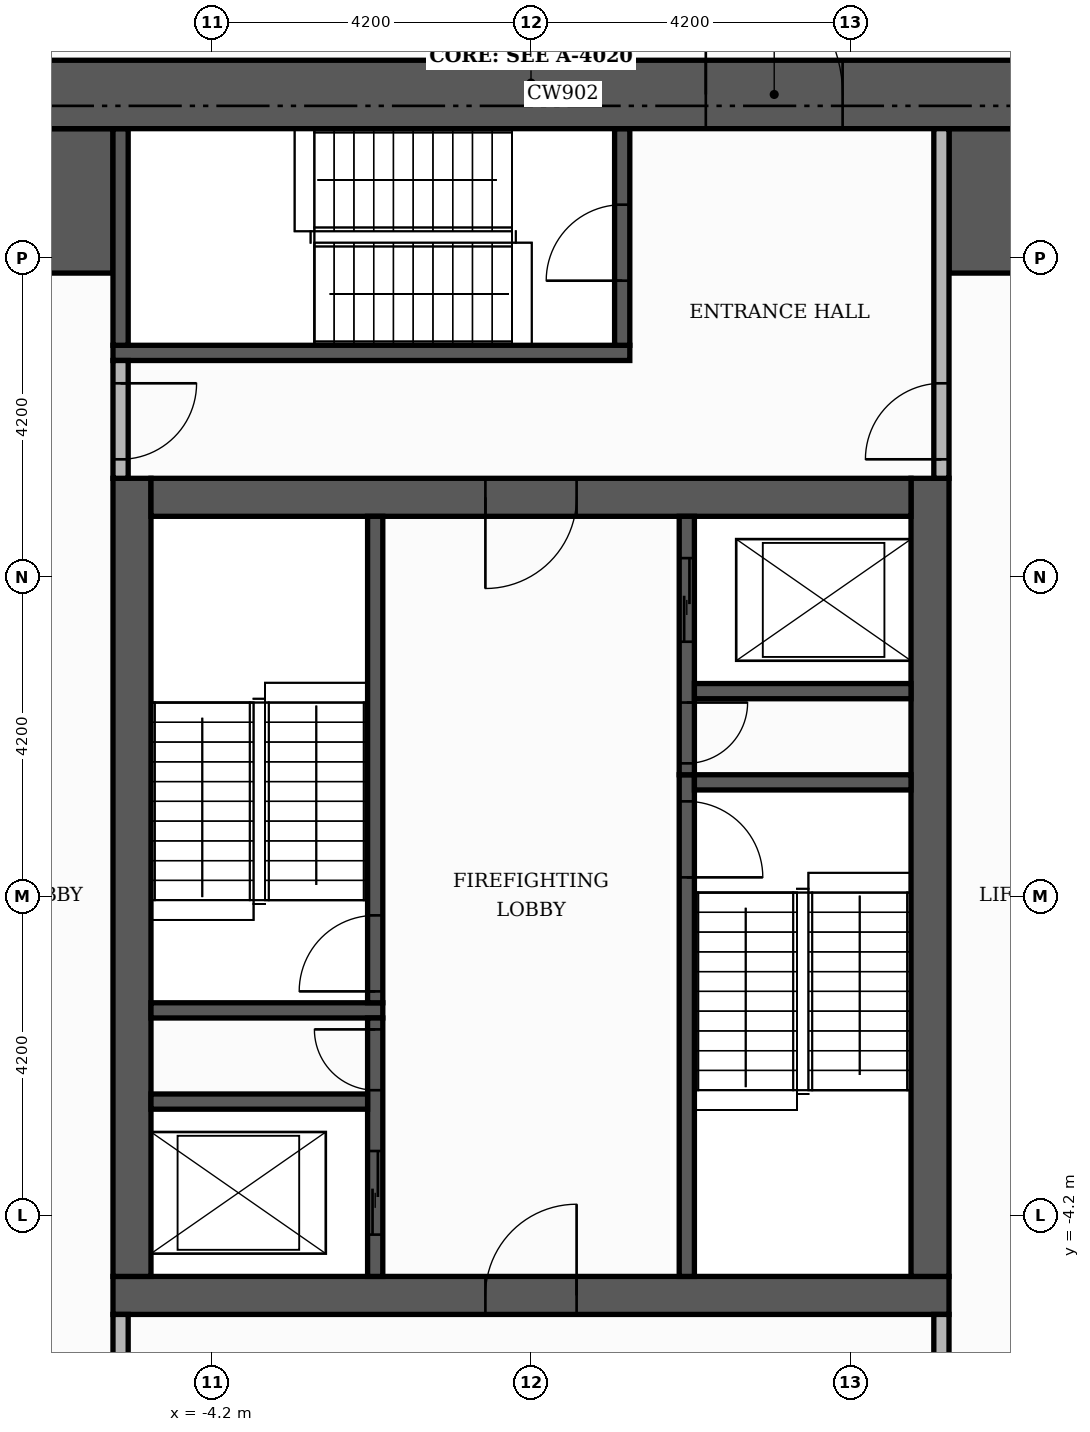
"""IFC4 building model, lengths in metres.
Left out: names, types, materials, properties, quantities, classifications, styles, units other than length and angle.
Written with IfcOpenShell. Run it as: python <this file> out.ifc"""

import sys

from ifc_helpers import new_model, si_unit, direction, frame, frame_2d, origin, place, context, subcontext, project, spatial, rectangle, extrude, element, fill, save


model = new_model("IFC4")
c1 = context("Model", 3, precision=1e-05, world=origin(), true_north=direction((0.0, 1.0)))
c2 = subcontext(c1, "Body", "Model", "MODEL_VIEW")
j1 = project(units=[si_unit("LENGTHUNIT", "METRE"), si_unit("PLANEANGLEUNIT", "RADIAN")], contexts=[c1])
p1 = place(None, origin())
s1 = spatial("IfcSite", under=j1, at=p1, CompositionType="ELEMENT")
p2 = place(p1, origin())
s2 = spatial("IfcBuilding", under=s1, at=p2, CompositionType="ELEMENT")
p3 = place(p2, frame((0.0, 0.0, 126.0)))
s3 = spatial("IfcBuildingStorey", under=s2, at=p3, CompositionType="ELEMENT", Elevation=126.0)
p4 = place(p3, frame((-5.5, -5.25, 0.0), z_axis=(0.0, 0.0, 1.0), x_axis=(1.0, 0.0, 0.0)))
e1 = element("IfcWall", 1, at=p4, inside=s3, PredefinedType="SHEAR", context=c2, shape_type="SweptSolid", body=[
    extrude(rectangle(XDim=11.0, YDim=0.5, at=frame_2d((5.5, 0.0))), origin(), (0.0, 0.0, 1.0), 7.38),
])
p5 = place(p4, frame((4.9, 0.0, 0.0)))
e2 = element("IfcOpeningElement", 2, at=p5, cuts=e1, PredefinedType="OPENING", context=c2, shape_type="SweptSolid", body=[
    extrude(rectangle(XDim=1.2, YDim=2.1, at=frame_2d((0.6, 1.05))), frame((0.0, 0.26, 0.0), z_axis=(0.0, -1.0, 0.0), x_axis=(1.0, 0.0, 0.0)), (0.0, 0.0, 1.0), 0.52),
])
for number, where, z_axis, x_axis in (
    (3, (-5.25, -5.0, 0.0), (0.0, 0.0, 1.0), (0.0, 1.0, 0.0)),
    (4, (5.25, -5.0, 0.0), (0.0, 0.0, 1.0), (0.0, 1.0, 0.0)),
):
    element("IfcWall", number, at=place(p3, frame(where, z_axis=z_axis, x_axis=x_axis)), inside=s3, PredefinedType="SHEAR", context=c2, shape_type="SweptSolid", body=[
        extrude(rectangle(XDim=10.5, YDim=0.5, at=frame_2d((5.25, 0.0))), origin(), (0.0, 0.0, 1.0), 7.38),
    ])
p6 = place(p3, frame((-5.0, 5.25, 0.0), z_axis=(0.0, 0.0, 1.0), x_axis=(1.0, 0.0, 0.0)))
e5 = element("IfcWall", 5, at=p6, inside=s3, PredefinedType="SHEAR", context=c2, shape_type="SweptSolid", body=[
    extrude(rectangle(XDim=10.0, YDim=0.5, at=frame_2d((5.0, 0.0))), origin(), (0.0, 0.0, 1.0), 7.38),
])
p7 = place(p6, frame((4.4, 0.0, 0.0)))
e6 = element("IfcOpeningElement", 6, at=p7, cuts=e5, PredefinedType="OPENING", context=c2, shape_type="SweptSolid", body=[
    extrude(rectangle(XDim=1.2, YDim=2.1, at=frame_2d((0.6, 1.05))), frame((0.0, 0.26, 0.0), z_axis=(0.0, -1.0, 0.0), x_axis=(1.0, 0.0, 0.0)), (0.0, 0.0, 1.0), 0.52),
])
for number, where, z_axis, x_axis in (
    (7, (-10.1, 9.15, 0.0), (0.0, 0.0, 1.0), (1.0, 0.0, 0.0)),
    (8, (5.5, 9.15, 0.0), (0.0, 0.0, 1.0), (1.0, 0.0, 0.0)),
):
    element("IfcWall", number, at=place(p3, frame(where, z_axis=z_axis, x_axis=x_axis)), inside=s3, PredefinedType="SHEAR", context=c2, shape_type="SweptSolid", body=[
        extrude(rectangle(XDim=4.6, YDim=1.9, at=frame_2d((2.3, 0.0))), origin(), (0.0, 0.0, 1.0), 7.38),
    ])
p8 = place(p3, frame((2.05, -5.0, 0.0), z_axis=(0.0, 0.0, 1.0), x_axis=(0.0, 1.0, 0.0)))
e9 = element("IfcWall", 9, at=p8, inside=s3, PredefinedType="SHEAR", context=c2, shape_type="SweptSolid", body=[
    extrude(rectangle(XDim=6.6, YDim=0.2, at=frame_2d((3.3, 0.0))), origin(), (0.0, 0.0, 1.0), 7.38),
])
p9 = place(p8, frame((5.25, 0.0, 0.0)))
e10 = element("IfcOpeningElement", 10, at=p9, cuts=e9, PredefinedType="OPENING", context=c2, shape_type="SweptSolid", body=[
    extrude(rectangle(XDim=1.0, YDim=2.1, at=frame_2d((0.5, 1.05))), frame((0.0, 0.11, 0.0), z_axis=(0.0, -1.0, 0.0), x_axis=(1.0, 0.0, 0.0)), (0.0, 0.0, 1.0), 0.22),
])
p10 = place(p3, frame((-5.0, -1.5, 0.0), z_axis=(0.0, 0.0, 1.0), x_axis=(1.0, 0.0, 0.0)))
e11 = element("IfcWall", 11, at=p10, inside=s3, PredefinedType="SHEAR", context=c2, shape_type="SweptSolid", body=[
    extrude(rectangle(XDim=3.05, YDim=0.2, at=frame_2d((1.525, 0.0))), origin(), (0.0, 0.0, 1.0), 7.38),
])
p11 = place(p3, frame((-2.05, -1.4, 0.0), z_axis=(0.0, 0.0, 1.0), x_axis=(0.0, 1.0, 0.0)))
e12 = element("IfcWall", 12, at=p11, inside=s3, PredefinedType="SHEAR", context=c2, shape_type="SweptSolid", body=[
    extrude(rectangle(XDim=6.4, YDim=0.2, at=frame_2d((3.2, 0.0))), origin(), (0.0, 0.0, 1.0), 7.38),
])
p12 = place(p11, frame((0.15, 0.0, 0.0)))
e13 = element("IfcOpeningElement", 13, at=p12, cuts=e12, PredefinedType="OPENING", context=c2, shape_type="SweptSolid", body=[
    extrude(rectangle(XDim=1.0, YDim=2.1, at=frame_2d((0.5, 1.05))), frame((0.0, 0.11, 0.0), z_axis=(0.0, -1.0, 0.0), x_axis=(1.0, 0.0, 0.0)), (0.0, 0.0, 1.0), 0.22),
])
p13 = place(p3, frame((2.15, 1.5, 0.0), z_axis=(0.0, 0.0, 1.0), x_axis=(1.0, 0.0, 0.0)))
e14 = element("IfcWall", 14, at=p13, inside=s3, PredefinedType="SHEAR", context=c2, shape_type="SweptSolid", body=[
    extrude(rectangle(XDim=2.85, YDim=0.2, at=frame_2d((1.425, 0.0))), origin(), (0.0, 0.0, 1.0), 7.38),
])
p14 = place(p3, frame((-5.5, 7.15, 0.0), z_axis=(0.0, 0.0, 1.0), x_axis=(1.0, 0.0, 0.0)))
e15 = element("IfcWall", 15, at=p14, inside=s3, PredefinedType="SHEAR", context=c2, shape_type="SweptSolid", body=[
    extrude(rectangle(XDim=6.8, YDim=0.2, at=frame_2d((3.4, 0.0))), origin(), (0.0, 0.0, 1.0), 7.38),
])
p15 = place(p3, frame((-5.4, 7.25, 0.0), z_axis=(0.0, 0.0, 1.0), x_axis=(0.0, 1.0, 0.0)))
e16 = element("IfcWall", 16, at=p15, inside=s3, PredefinedType="SHEAR", context=c2, shape_type="SweptSolid", body=[
    extrude(rectangle(XDim=2.85, YDim=0.2, at=frame_2d((1.425, 0.0))), origin(), (0.0, 0.0, 1.0), 7.38),
])
p16 = place(p3, frame((1.2, 7.25, 0.0), z_axis=(0.0, 0.0, 1.0), x_axis=(0.0, 1.0, 0.0)))
e17 = element("IfcWall", 17, at=p16, inside=s3, PredefinedType="SHEAR", context=c2, shape_type="SweptSolid", body=[
    extrude(rectangle(XDim=2.85, YDim=0.2, at=frame_2d((1.425, 0.0))), origin(), (0.0, 0.0, 1.0), 7.38),
])
p17 = place(p16, frame((0.85, 0.0, 0.0)))
e18 = element("IfcOpeningElement", 18, at=p17, cuts=e17, PredefinedType="OPENING", context=c2, shape_type="SweptSolid", body=[
    extrude(rectangle(XDim=1.0, YDim=2.1, at=frame_2d((0.5, 1.05))), frame((0.0, 0.11, 0.0), z_axis=(0.0, -1.0, 0.0), x_axis=(1.0, 0.0, 0.0)), (0.0, 0.0, 1.0), 0.22),
])
p18 = place(p3, frame((-2.05, -5.0, 0.0), z_axis=(0.0, 0.0, 1.0), x_axis=(0.0, 1.0, 0.0)))
e19 = element("IfcWall", 19, at=p18, inside=s3, PredefinedType="SHEAR", context=c2, shape_type="SweptSolid", body=[
    extrude(rectangle(XDim=3.4, YDim=0.2, at=frame_2d((1.7, 0.0))), origin(), (0.0, 0.0, 1.0), 7.38),
])
p19 = place(p18, frame((0.55, 0.0, 0.0)))
e20 = element("IfcOpeningElement", 20, at=p19, cuts=e19, PredefinedType="OPENING", context=c2, shape_type="SweptSolid", body=[
    extrude(rectangle(XDim=1.1, YDim=2.1, at=frame_2d((0.55, 1.05))), frame((0.0, 0.11, 0.0), z_axis=(0.0, -1.0, 0.0), x_axis=(1.0, 0.0, 0.0)), (0.0, 0.0, 1.0), 0.22),
])
p20 = place(p18, frame((2.45, 0.0, 0.0)))
e21 = element("IfcOpeningElement", 21, at=p20, cuts=e19, PredefinedType="OPENING", context=c2, shape_type="SweptSolid", body=[
    extrude(rectangle(XDim=0.8, YDim=2.1, at=frame_2d((0.4, 1.05))), frame((0.0, 0.11, 0.0), z_axis=(0.0, -1.0, 0.0), x_axis=(1.0, 0.0, 0.0)), (0.0, 0.0, 1.0), 0.22),
])
p21 = place(p3, frame((-5.0, -2.7, 0.0), z_axis=(0.0, 0.0, 1.0), x_axis=(1.0, 0.0, 0.0)))
e22 = element("IfcWall", 22, at=p21, inside=s3, PredefinedType="SHEAR", context=c2, shape_type="SweptSolid", body=[
    extrude(rectangle(XDim=2.85, YDim=0.2, at=frame_2d((1.425, 0.0))), origin(), (0.0, 0.0, 1.0), 7.38),
])
p22 = place(p3, frame((2.05, 1.6, 0.0), z_axis=(0.0, 0.0, 1.0), x_axis=(0.0, 1.0, 0.0)))
e23 = element("IfcWall", 23, at=p22, inside=s3, PredefinedType="SHEAR", context=c2, shape_type="SweptSolid", body=[
    extrude(rectangle(XDim=3.4, YDim=0.2, at=frame_2d((1.7, 0.0))), origin(), (0.0, 0.0, 1.0), 7.38),
])
p23 = place(p22, frame((1.75, 0.0, 0.0)))
e24 = element("IfcOpeningElement", 24, at=p23, cuts=e23, PredefinedType="OPENING", context=c2, shape_type="SweptSolid", body=[
    extrude(rectangle(XDim=1.1, YDim=2.1, at=frame_2d((0.55, 1.05))), frame((0.0, 0.11, 0.0), z_axis=(0.0, -1.0, 0.0), x_axis=(1.0, 0.0, 0.0)), (0.0, 0.0, 1.0), 0.22),
])
p24 = place(p22, frame((0.15, 0.0, 0.0)))
e25 = element("IfcOpeningElement", 25, at=p24, cuts=e23, PredefinedType="OPENING", context=c2, shape_type="SweptSolid", body=[
    extrude(rectangle(XDim=0.8, YDim=2.1, at=frame_2d((0.4, 1.05))), frame((0.0, 0.11, 0.0), z_axis=(0.0, -1.0, 0.0), x_axis=(1.0, 0.0, 0.0)), (0.0, 0.0, 1.0), 0.22),
])
p25 = place(p3, frame((2.15, 2.7, 0.0), z_axis=(0.0, 0.0, 1.0), x_axis=(1.0, 0.0, 0.0)))
e26 = element("IfcWall", 26, at=p25, inside=s3, PredefinedType="SHEAR", context=c2, shape_type="SweptSolid", body=[
    extrude(rectangle(XDim=2.85, YDim=0.2, at=frame_2d((1.425, 0.0))), origin(), (0.0, 0.0, 1.0), 7.38),
])
p26 = place(p3, frame((-11.0, 10.55, 0.0), z_axis=(0.0, 0.0, 1.0), x_axis=(1.0, 0.0, 0.0)))
e27 = element("IfcWall", 27, at=p26, inside=s3, PredefinedType="SHEAR", context=c2, shape_type="SweptSolid", body=[
    extrude(rectangle(XDim=22.0, YDim=0.9, at=frame_2d((11.0, 0.0))), origin(), (0.0, 0.0, 1.0), 7.38),
])
p27 = place(p26, frame((13.3, 0.0, 0.0)))
e28 = element("IfcOpeningElement", 28, at=p27, cuts=e27, PredefinedType="OPENING", context=c2, shape_type="SweptSolid", body=[
    extrude(rectangle(XDim=1.8, YDim=2.2, at=frame_2d((0.9, 1.1))), frame((0.0, 0.46, 0.0), z_axis=(0.0, -1.0, 0.0), x_axis=(1.0, 0.0, 0.0)), (0.0, 0.0, 1.0), 0.92),
])
p28 = place(p3, frame((-5.4, -10.1, 0.0), z_axis=(0.0, 0.0, 1.0), x_axis=(0.0, 1.0, 0.0)))
e29 = element("IfcWall", 29, at=p28, inside=s3, PredefinedType="PARTITIONING", context=c2, shape_type="SweptSolid", body=[
    extrude(rectangle(XDim=4.6, YDim=0.2, at=frame_2d((2.3, 0.0))), origin(), (0.0, 0.0, 1.0), 7.38),
])
p29 = place(p28, frame((2.9, 0.0, 0.0)))
e30 = element("IfcOpeningElement", 30, at=p29, cuts=e29, PredefinedType="OPENING", context=c2, shape_type="SweptSolid", body=[
    extrude(rectangle(XDim=1.0, YDim=2.1, at=frame_2d((0.5, 1.05))), frame((0.0, 0.11, 0.0), z_axis=(0.0, -1.0, 0.0), x_axis=(1.0, 0.0, 0.0)), (0.0, 0.0, 1.0), 0.22),
])
p30 = place(p3, frame((5.4, -7.9, 0.0), z_axis=(0.0, 0.0, 1.0), x_axis=(0.0, 1.0, 0.0)))
e31 = element("IfcWall", 31, at=p30, inside=s3, PredefinedType="PARTITIONING", context=c2, shape_type="SweptSolid", body=[
    extrude(rectangle(XDim=2.4, YDim=0.2, at=frame_2d((1.2, 0.0))), origin(), (0.0, 0.0, 1.0), 7.38),
])
p31 = place(p30, frame((0.7, 0.0, 0.0)))
e32 = element("IfcOpeningElement", 32, at=p31, cuts=e31, PredefinedType="OPENING", context=c2, shape_type="SweptSolid", body=[
    extrude(rectangle(XDim=1.0, YDim=2.1, at=frame_2d((0.5, 1.05))), frame((0.0, 0.11, 0.0), z_axis=(0.0, -1.0, 0.0), x_axis=(1.0, 0.0, 0.0)), (0.0, 0.0, 1.0), 0.22),
])
p32 = place(p3, frame((-5.4, 5.5, 0.0), z_axis=(0.0, 0.0, 1.0), x_axis=(0.0, 1.0, 0.0)))
e33 = element("IfcWall", 33, at=p32, inside=s3, PredefinedType="PARTITIONING", context=c2, shape_type="SweptSolid", body=[
    extrude(rectangle(XDim=1.55, YDim=0.2, at=frame_2d((0.775, 0.0))), origin(), (0.0, 0.0, 1.0), 7.38),
])
p33 = place(p32, frame((0.25, 0.0, 0.0)))
e34 = element("IfcOpeningElement", 34, at=p33, cuts=e33, PredefinedType="OPENING", context=c2, shape_type="SweptSolid", body=[
    extrude(rectangle(XDim=1.0, YDim=2.1, at=frame_2d((0.5, 1.05))), frame((0.0, 0.11, 0.0), z_axis=(0.0, -1.0, 0.0), x_axis=(1.0, 0.0, 0.0)), (0.0, 0.0, 1.0), 0.22),
])
p34 = place(p3, frame((5.4, 5.5, 0.0), z_axis=(0.0, 0.0, 1.0), x_axis=(0.0, 1.0, 0.0)))
e35 = element("IfcWall", 35, at=p34, inside=s3, PredefinedType="PARTITIONING", context=c2, shape_type="SweptSolid", body=[
    extrude(rectangle(XDim=4.6, YDim=0.2, at=frame_2d((2.3, 0.0))), origin(), (0.0, 0.0, 1.0), 7.38),
])
p35 = place(p34, frame((0.25, 0.0, 0.0)))
e36 = element("IfcOpeningElement", 36, at=p35, cuts=e35, PredefinedType="OPENING", context=c2, shape_type="SweptSolid", body=[
    extrude(rectangle(XDim=1.0, YDim=2.1, at=frame_2d((0.5, 1.05))), frame((0.0, 0.11, 0.0), z_axis=(0.0, -1.0, 0.0), x_axis=(1.0, 0.0, 0.0)), (0.0, 0.0, 1.0), 0.22),
])
p36 = place(p23, origin())
e37 = element("IfcDoor", 37, at=p36, inside=s3, OperationType="SLIDING_TO_LEFT", PredefinedType="DOOR", context=c2, shape_type="SweptSolid", body=[
    extrude(rectangle(XDim=1.1, YDim=2.1, at=frame_2d((0.55, 1.05))), frame((0.0, 0.025, 0.0), z_axis=(0.0, -1.0, 0.0), x_axis=(1.0, 0.0, 0.0)), (0.0, 0.0, 1.0), 0.05),
])
fill(e24, e37)
p37 = place(p19, origin())
e38 = element("IfcDoor", 38, at=p37, inside=s3, OperationType="SLIDING_TO_LEFT", PredefinedType="DOOR", context=c2, shape_type="SweptSolid", body=[
    extrude(rectangle(XDim=1.1, YDim=2.1, at=frame_2d((0.55, 1.05))), frame((0.0, 0.025, 0.0), z_axis=(0.0, -1.0, 0.0), x_axis=(1.0, 0.0, 0.0)), (0.0, 0.0, 1.0), 0.05),
])
fill(e20, e38)
p38 = place(p12, origin())
e39 = element("IfcDoor", 39, at=p38, inside=s3, OperationType="SINGLE_SWING_LEFT", PredefinedType="DOOR", context=c2, shape_type="SweptSolid", body=[
    extrude(rectangle(XDim=1.0, YDim=2.1, at=frame_2d((0.5, 1.05))), frame((0.0, 0.025, 0.0), z_axis=(0.0, -1.0, 0.0), x_axis=(1.0, 0.0, 0.0)), (0.0, 0.0, 1.0), 0.05),
])
fill(e13, e39)
p39 = place(p9, frame((1.0, 0.0, 0.0), z_axis=(0.0, 0.0, 1.0), x_axis=(-1.0, 0.0, 0.0)))
e40 = element("IfcDoor", 40, at=p39, inside=s3, OperationType="SINGLE_SWING_LEFT", PredefinedType="DOOR", context=c2, shape_type="SweptSolid", body=[
    extrude(rectangle(XDim=1.0, YDim=2.1, at=frame_2d((0.5, 1.05))), frame((0.0, 0.025, 0.0), z_axis=(0.0, -1.0, 0.0), x_axis=(1.0, 0.0, 0.0)), (0.0, 0.0, 1.0), 0.05),
])
fill(e10, e40)
p40 = place(p24, frame((0.8, 0.0, 0.0), z_axis=(0.0, 0.0, 1.0), x_axis=(-1.0, 0.0, 0.0)))
e41 = element("IfcDoor", 41, at=p40, inside=s3, OperationType="SINGLE_SWING_RIGHT", PredefinedType="DOOR", context=c2, shape_type="SweptSolid", body=[
    extrude(rectangle(XDim=0.8, YDim=2.1, at=frame_2d((0.4, 1.05))), frame((0.0, 0.025, 0.0), z_axis=(0.0, -1.0, 0.0), x_axis=(1.0, 0.0, 0.0)), (0.0, 0.0, 1.0), 0.05),
])
fill(e25, e41)
p41 = place(p20, origin())
e42 = element("IfcDoor", 42, at=p41, inside=s3, OperationType="SINGLE_SWING_RIGHT", PredefinedType="DOOR", context=c2, shape_type="SweptSolid", body=[
    extrude(rectangle(XDim=0.8, YDim=2.1, at=frame_2d((0.4, 1.05))), frame((0.0, 0.025, 0.0), z_axis=(0.0, -1.0, 0.0), x_axis=(1.0, 0.0, 0.0)), (0.0, 0.0, 1.0), 0.05),
])
fill(e21, e42)
p42 = place(p7, frame((1.2, 0.0, 0.0), z_axis=(0.0, 0.0, 1.0), x_axis=(-1.0, 0.0, 0.0)))
e43 = element("IfcDoor", 43, at=p42, inside=s3, OperationType="SINGLE_SWING_LEFT", PredefinedType="DOOR", context=c2, shape_type="SweptSolid", body=[
    extrude(rectangle(XDim=1.2, YDim=2.1, at=frame_2d((0.6, 1.05))), frame((0.0, 0.025, 0.0), z_axis=(0.0, -1.0, 0.0), x_axis=(1.0, 0.0, 0.0)), (0.0, 0.0, 1.0), 0.05),
])
fill(e6, e43)
p43 = place(p5, origin())
e44 = element("IfcDoor", 44, at=p43, inside=s3, OperationType="SINGLE_SWING_RIGHT", PredefinedType="DOOR", context=c2, shape_type="SweptSolid", body=[
    extrude(rectangle(XDim=1.2, YDim=2.1, at=frame_2d((0.6, 1.05))), frame((0.0, 0.025, 0.0), z_axis=(0.0, -1.0, 0.0), x_axis=(1.0, 0.0, 0.0)), (0.0, 0.0, 1.0), 0.05),
])
fill(e2, e44)
p44 = place(p17, origin())
e45 = element("IfcDoor", 45, at=p44, inside=s3, OperationType="SINGLE_SWING_LEFT", PredefinedType="DOOR", context=c2, shape_type="SweptSolid", body=[
    extrude(rectangle(XDim=1.0, YDim=2.1, at=frame_2d((0.5, 1.05))), frame((0.0, 0.025, 0.0), z_axis=(0.0, -1.0, 0.0), x_axis=(1.0, 0.0, 0.0)), (0.0, 0.0, 1.0), 0.05),
])
fill(e18, e45)
p45 = place(p33, frame((1.0, 0.0, 0.0), z_axis=(0.0, 0.0, 1.0), x_axis=(-1.0, 0.0, 0.0)))
e46 = element("IfcDoor", 46, at=p45, inside=s3, OperationType="SINGLE_SWING_RIGHT", PredefinedType="DOOR", context=c2, shape_type="SweptSolid", body=[
    extrude(rectangle(XDim=1.0, YDim=2.1, at=frame_2d((0.5, 1.05))), frame((0.0, 0.025, 0.0), z_axis=(0.0, -1.0, 0.0), x_axis=(1.0, 0.0, 0.0)), (0.0, 0.0, 1.0), 0.05),
])
fill(e34, e46)
p46 = place(p35, origin())
e47 = element("IfcDoor", 47, at=p46, inside=s3, OperationType="SINGLE_SWING_LEFT", PredefinedType="DOOR", context=c2, shape_type="SweptSolid", body=[
    extrude(rectangle(XDim=1.0, YDim=2.1, at=frame_2d((0.5, 1.05))), frame((0.0, 0.025, 0.0), z_axis=(0.0, -1.0, 0.0), x_axis=(1.0, 0.0, 0.0)), (0.0, 0.0, 1.0), 0.05),
])
fill(e36, e47)
p47 = place(p27, origin())
e48 = element("IfcDoor", 48, at=p47, inside=s3, OperationType="DOUBLE_DOOR_SINGLE_SWING", PredefinedType="DOOR", context=c2, shape_type="SweptSolid", body=[
    extrude(rectangle(XDim=1.8, YDim=2.2, at=frame_2d((0.9, 1.1))), frame((0.0, 0.025, 0.0), z_axis=(0.0, -1.0, 0.0), x_axis=(1.0, 0.0, 0.0)), (0.0, 0.0, 1.0), 0.05),
])
fill(e28, e48)
save(model, sys.argv[1])
